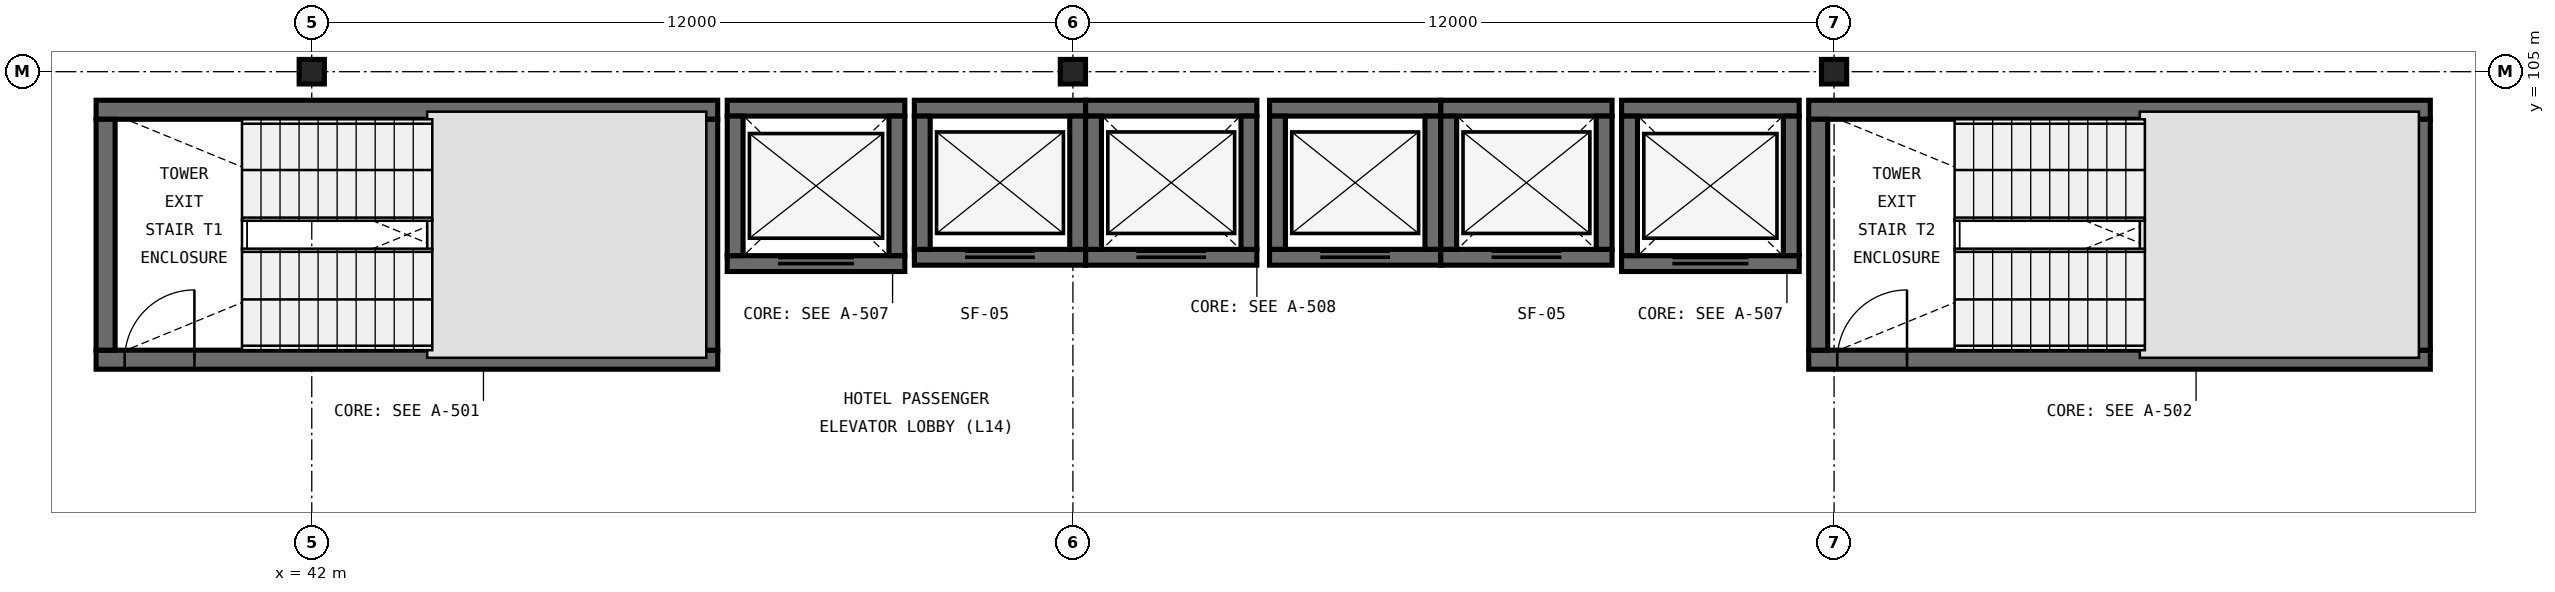
"""IFC4 building model, lengths in metres.
Left out: names, types, materials, properties, quantities, classifications, styles, units other than length and angle.
Written with IfcOpenShell. Run it as: python <this file> out.ifc"""

import sys

from ifc_helpers import new_model, si_unit, direction, frame, frame_2d, origin, origin_2d, place, context, subcontext, project, spatial, rectangle, i_section, extrude, element, fill, save


model = new_model("IFC4")
c1 = context("Model", 3, precision=1e-05, world=origin(), true_north=direction((0.0, 1.0)))
c2 = subcontext(c1, "Body", "Model", "MODEL_VIEW")
j1 = project(units=[si_unit("LENGTHUNIT", "METRE"), si_unit("PLANEANGLEUNIT", "RADIAN")], contexts=[c1])
p1 = place(None, origin())
s1 = spatial("IfcSite", under=j1, at=p1, CompositionType="ELEMENT")
p2 = place(p1, origin())
s2 = spatial("IfcBuilding", under=s1, at=p2, CompositionType="ELEMENT")
p3 = place(p2, frame((0.0, 0.0, 60.0)))
s3 = spatial("IfcBuildingStorey", under=s2, at=p3, CompositionType="ELEMENT", Elevation=60.0)
for number, where, z_axis, x_axis in (
    (1, (42.0, 105.0, 0.0), (0.0, 0.0, 1.0), (1.0, 0.0, 0.0)),
    (2, (54.0, 105.0, 0.0), (0.0, 0.0, 1.0), (1.0, 0.0, 0.0)),
    (3, (66.0, 105.0, 0.0), (0.0, 0.0, 1.0), (1.0, 0.0, 0.0)),
):
    element("IfcColumn", number, at=place(p3, frame(where, z_axis=z_axis, x_axis=x_axis)), inside=s3, PredefinedType="COLUMN", context=c2, shape_type="SweptSolid", body=[
        extrude(i_section(OverallWidth=0.398, OverallDepth=0.387, WebThickness=0.021, FlangeThickness=0.033, FilletRadius=0.031, at=origin_2d()), origin(), (0.0, 0.0, 1.0), 3.6),
    ])
p4 = place(p3, frame((38.6, 100.46, 0.0), z_axis=(0.0, 0.0, 1.0), x_axis=(1.0, 0.0, 0.0)))
e4 = element("IfcWall", 4, at=p4, inside=s3, PredefinedType="SHEAR", context=c2, shape_type="SweptSolid", body=[
    extrude(rectangle(XDim=9.8, YDim=0.3, at=frame_2d((4.9, 0.0))), origin(), (0.0, 0.0, 1.0), 3.6),
])
p5 = place(p4, frame((0.45, 0.0, 0.0)))
e5 = element("IfcOpeningElement", 5, at=p5, cuts=e4, PredefinedType="OPENING", context=c2, shape_type="SweptSolid", body=[
    extrude(rectangle(XDim=1.1, YDim=2.2, at=frame_2d((0.55, 1.1))), frame((0.0, 0.165, 0.0), z_axis=(0.0, -1.0, 0.0), x_axis=(1.0, 0.0, 0.0)), (0.0, 0.0, 1.0), 0.33),
])
p6 = place(p3, frame((48.4, 104.4, 0.0), z_axis=(0.0, 0.0, 1.0), x_axis=(-1.0, 0.0, 0.0)))
e6 = element("IfcWall", 6, at=p6, inside=s3, PredefinedType="SHEAR", context=c2, shape_type="SweptSolid", body=[
    extrude(rectangle(XDim=9.8, YDim=0.3, at=frame_2d((4.9, 0.0))), origin(), (0.0, 0.0, 1.0), 3.6),
])
for number, where, z_axis, x_axis in (
    (7, (38.75, 104.25, 0.0), (0.0, 0.0, 1.0), (0.0, -1.0, 0.0)),
    (8, (48.25, 100.61, 0.0), (0.0, 0.0, 1.0), (0.0, 1.0, 0.0)),
):
    element("IfcWall", number, at=place(p3, frame(where, z_axis=z_axis, x_axis=x_axis)), inside=s3, PredefinedType="SHEAR", context=c2, shape_type="SweptSolid", body=[
        extrude(rectangle(XDim=3.64, YDim=0.3, at=frame_2d((1.82, 0.0))), origin(), (0.0, 0.0, 1.0), 3.6),
    ])
p7 = place(p3, frame((65.6, 100.46, 0.0), z_axis=(0.0, 0.0, 1.0), x_axis=(1.0, 0.0, 0.0)))
e9 = element("IfcWall", 9, at=p7, inside=s3, PredefinedType="SHEAR", context=c2, shape_type="SweptSolid", body=[
    extrude(rectangle(XDim=9.8, YDim=0.3, at=frame_2d((4.9, 0.0))), origin(), (0.0, 0.0, 1.0), 3.6),
])
p8 = place(p7, frame((0.45, 0.0, 0.0)))
e10 = element("IfcOpeningElement", 10, at=p8, cuts=e9, PredefinedType="OPENING", context=c2, shape_type="SweptSolid", body=[
    extrude(rectangle(XDim=1.1, YDim=2.2, at=frame_2d((0.55, 1.1))), frame((0.0, 0.165, 0.0), z_axis=(0.0, -1.0, 0.0), x_axis=(1.0, 0.0, 0.0)), (0.0, 0.0, 1.0), 0.33),
])
p9 = place(p3, frame((75.4, 104.4, 0.0), z_axis=(0.0, 0.0, 1.0), x_axis=(-1.0, 0.0, 0.0)))
e11 = element("IfcWall", 11, at=p9, inside=s3, PredefinedType="SHEAR", context=c2, shape_type="SweptSolid", body=[
    extrude(rectangle(XDim=9.8, YDim=0.3, at=frame_2d((4.9, 0.0))), origin(), (0.0, 0.0, 1.0), 3.6),
])
for number, where, z_axis, x_axis in (
    (12, (65.75, 104.25, 0.0), (0.0, 0.0, 1.0), (0.0, -1.0, 0.0)),
    (13, (75.25, 100.61, 0.0), (0.0, 0.0, 1.0), (0.0, 1.0, 0.0)),
):
    element("IfcWall", number, at=place(p3, frame(where, z_axis=z_axis, x_axis=x_axis)), inside=s3, PredefinedType="SHEAR", context=c2, shape_type="SweptSolid", body=[
        extrude(rectangle(XDim=3.64, YDim=0.3, at=frame_2d((1.82, 0.0))), origin(), (0.0, 0.0, 1.0), 3.6),
    ])
p10 = place(p3, frame((48.55, 101.975, 0.0), z_axis=(0.0, 0.0, 1.0), x_axis=(1.0, 0.0, 0.0)))
e14 = element("IfcWall", 14, at=p10, inside=s3, PredefinedType="SHEAR", context=c2, shape_type="SweptSolid", body=[
    extrude(rectangle(XDim=2.8, YDim=0.25, at=frame_2d((1.4, 0.0))), origin(), (0.0, 0.0, 1.0), 3.6),
])
p11 = place(p10, frame((0.8, 0.0, 0.0)))
e15 = element("IfcOpeningElement", 15, at=p11, cuts=e14, PredefinedType="OPENING", context=c2, shape_type="SweptSolid", body=[
    extrude(rectangle(XDim=1.2, YDim=2.2, at=frame_2d((0.6, 1.1))), frame((0.0, 0.14, 0.0), z_axis=(0.0, -1.0, 0.0), x_axis=(1.0, 0.0, 0.0)), (0.0, 0.0, 1.0), 0.28),
])
p12 = place(p3, frame((51.35, 104.425, 0.0), z_axis=(0.0, 0.0, 1.0), x_axis=(-1.0, 0.0, 0.0)))
e16 = element("IfcWall", 16, at=p12, inside=s3, PredefinedType="SHEAR", context=c2, shape_type="SweptSolid", body=[
    extrude(rectangle(XDim=2.8, YDim=0.25, at=frame_2d((1.4, 0.0))), origin(), (0.0, 0.0, 1.0), 3.6),
])
for number, where, z_axis, x_axis in (
    (17, (48.675, 104.3, 0.0), (0.0, 0.0, 1.0), (0.0, -1.0, 0.0)),
    (18, (51.225, 102.1, 0.0), (0.0, 0.0, 1.0), (0.0, 1.0, 0.0)),
):
    element("IfcWall", number, at=place(p3, frame(where, z_axis=z_axis, x_axis=x_axis)), inside=s3, PredefinedType="SHEAR", context=c2, shape_type="SweptSolid", body=[
        extrude(rectangle(XDim=2.2, YDim=0.25, at=frame_2d((1.1, 0.0))), origin(), (0.0, 0.0, 1.0), 3.6),
    ])
p13 = place(p3, frame((62.65, 101.975, 0.0), z_axis=(0.0, 0.0, 1.0), x_axis=(1.0, 0.0, 0.0)))
e19 = element("IfcWall", 19, at=p13, inside=s3, PredefinedType="SHEAR", context=c2, shape_type="SweptSolid", body=[
    extrude(rectangle(XDim=2.8, YDim=0.25, at=frame_2d((1.4, 0.0))), origin(), (0.0, 0.0, 1.0), 3.6),
])
p14 = place(p13, frame((0.8, 0.0, 0.0)))
e20 = element("IfcOpeningElement", 20, at=p14, cuts=e19, PredefinedType="OPENING", context=c2, shape_type="SweptSolid", body=[
    extrude(rectangle(XDim=1.2, YDim=2.2, at=frame_2d((0.6, 1.1))), frame((0.0, 0.14, 0.0), z_axis=(0.0, -1.0, 0.0), x_axis=(1.0, 0.0, 0.0)), (0.0, 0.0, 1.0), 0.28),
])
p15 = place(p3, frame((65.45, 104.425, 0.0), z_axis=(0.0, 0.0, 1.0), x_axis=(-1.0, 0.0, 0.0)))
e21 = element("IfcWall", 21, at=p15, inside=s3, PredefinedType="SHEAR", context=c2, shape_type="SweptSolid", body=[
    extrude(rectangle(XDim=2.8, YDim=0.25, at=frame_2d((1.4, 0.0))), origin(), (0.0, 0.0, 1.0), 3.6),
])
for number, where, z_axis, x_axis in (
    (22, (62.775, 104.3, 0.0), (0.0, 0.0, 1.0), (0.0, -1.0, 0.0)),
    (23, (65.325, 102.1, 0.0), (0.0, 0.0, 1.0), (0.0, 1.0, 0.0)),
):
    element("IfcWall", number, at=place(p3, frame(where, z_axis=z_axis, x_axis=x_axis)), inside=s3, PredefinedType="SHEAR", context=c2, shape_type="SweptSolid", body=[
        extrude(rectangle(XDim=2.2, YDim=0.25, at=frame_2d((1.1, 0.0))), origin(), (0.0, 0.0, 1.0), 3.6),
    ])
p16 = place(p3, frame((51.5, 102.075, 0.0), z_axis=(0.0, 0.0, 1.0), x_axis=(1.0, 0.0, 0.0)))
e24 = element("IfcWall", 24, at=p16, inside=s3, PredefinedType="SHEAR", context=c2, shape_type="SweptSolid", body=[
    extrude(rectangle(XDim=2.7, YDim=0.25, at=frame_2d((1.35, 0.0))), origin(), (0.0, 0.0, 1.0), 3.6),
])
p17 = place(p16, frame((0.8, 0.0, 0.0)))
e25 = element("IfcOpeningElement", 25, at=p17, cuts=e24, PredefinedType="OPENING", context=c2, shape_type="SweptSolid", body=[
    extrude(rectangle(XDim=1.1, YDim=2.2, at=frame_2d((0.55, 1.1))), frame((0.0, 0.14, 0.0), z_axis=(0.0, -1.0, 0.0), x_axis=(1.0, 0.0, 0.0)), (0.0, 0.0, 1.0), 0.28),
])
p18 = place(p3, frame((54.2, 104.425, 0.0), z_axis=(0.0, 0.0, 1.0), x_axis=(-1.0, 0.0, 0.0)))
e26 = element("IfcWall", 26, at=p18, inside=s3, PredefinedType="SHEAR", context=c2, shape_type="SweptSolid", body=[
    extrude(rectangle(XDim=2.7, YDim=0.25, at=frame_2d((1.35, 0.0))), origin(), (0.0, 0.0, 1.0), 3.6),
])
for number, where, z_axis, x_axis in (
    (27, (51.625, 104.3, 0.0), (0.0, 0.0, 1.0), (0.0, -1.0, 0.0)),
    (28, (54.075, 102.2, 0.0), (0.0, 0.0, 1.0), (0.0, 1.0, 0.0)),
):
    element("IfcWall", number, at=place(p3, frame(where, z_axis=z_axis, x_axis=x_axis)), inside=s3, PredefinedType="SHEAR", context=c2, shape_type="SweptSolid", body=[
        extrude(rectangle(XDim=2.1, YDim=0.25, at=frame_2d((1.05, 0.0))), origin(), (0.0, 0.0, 1.0), 3.6),
    ])
p19 = place(p3, frame((54.2, 102.075, 0.0), z_axis=(0.0, 0.0, 1.0), x_axis=(1.0, 0.0, 0.0)))
e29 = element("IfcWall", 29, at=p19, inside=s3, PredefinedType="SHEAR", context=c2, shape_type="SweptSolid", body=[
    extrude(rectangle(XDim=2.7, YDim=0.25, at=frame_2d((1.35, 0.0))), origin(), (0.0, 0.0, 1.0), 3.6),
])
p20 = place(p19, frame((0.8, 0.0, 0.0)))
e30 = element("IfcOpeningElement", 30, at=p20, cuts=e29, PredefinedType="OPENING", context=c2, shape_type="SweptSolid", body=[
    extrude(rectangle(XDim=1.1, YDim=2.2, at=frame_2d((0.55, 1.1))), frame((0.0, 0.14, 0.0), z_axis=(0.0, -1.0, 0.0), x_axis=(1.0, 0.0, 0.0)), (0.0, 0.0, 1.0), 0.28),
])
p21 = place(p3, frame((56.9, 104.425, 0.0), z_axis=(0.0, 0.0, 1.0), x_axis=(-1.0, 0.0, 0.0)))
e31 = element("IfcWall", 31, at=p21, inside=s3, PredefinedType="SHEAR", context=c2, shape_type="SweptSolid", body=[
    extrude(rectangle(XDim=2.7, YDim=0.25, at=frame_2d((1.35, 0.0))), origin(), (0.0, 0.0, 1.0), 3.6),
])
for number, where, z_axis, x_axis in (
    (32, (54.325, 104.3, 0.0), (0.0, 0.0, 1.0), (0.0, -1.0, 0.0)),
    (33, (56.775, 102.2, 0.0), (0.0, 0.0, 1.0), (0.0, 1.0, 0.0)),
):
    element("IfcWall", number, at=place(p3, frame(where, z_axis=z_axis, x_axis=x_axis)), inside=s3, PredefinedType="SHEAR", context=c2, shape_type="SweptSolid", body=[
        extrude(rectangle(XDim=2.1, YDim=0.25, at=frame_2d((1.05, 0.0))), origin(), (0.0, 0.0, 1.0), 3.6),
    ])
p22 = place(p3, frame((57.1, 102.075, 0.0), z_axis=(0.0, 0.0, 1.0), x_axis=(1.0, 0.0, 0.0)))
e34 = element("IfcWall", 34, at=p22, inside=s3, PredefinedType="SHEAR", context=c2, shape_type="SweptSolid", body=[
    extrude(rectangle(XDim=2.7, YDim=0.25, at=frame_2d((1.35, 0.0))), origin(), (0.0, 0.0, 1.0), 3.6),
])
p23 = place(p22, frame((0.8, 0.0, 0.0)))
e35 = element("IfcOpeningElement", 35, at=p23, cuts=e34, PredefinedType="OPENING", context=c2, shape_type="SweptSolid", body=[
    extrude(rectangle(XDim=1.1, YDim=2.2, at=frame_2d((0.55, 1.1))), frame((0.0, 0.14, 0.0), z_axis=(0.0, -1.0, 0.0), x_axis=(1.0, 0.0, 0.0)), (0.0, 0.0, 1.0), 0.28),
])
p24 = place(p3, frame((59.8, 104.425, 0.0), z_axis=(0.0, 0.0, 1.0), x_axis=(-1.0, 0.0, 0.0)))
e36 = element("IfcWall", 36, at=p24, inside=s3, PredefinedType="SHEAR", context=c2, shape_type="SweptSolid", body=[
    extrude(rectangle(XDim=2.7, YDim=0.25, at=frame_2d((1.35, 0.0))), origin(), (0.0, 0.0, 1.0), 3.6),
])
for number, where, z_axis, x_axis in (
    (37, (57.225, 104.3, 0.0), (0.0, 0.0, 1.0), (0.0, -1.0, 0.0)),
    (38, (59.675, 102.2, 0.0), (0.0, 0.0, 1.0), (0.0, 1.0, 0.0)),
):
    element("IfcWall", number, at=place(p3, frame(where, z_axis=z_axis, x_axis=x_axis)), inside=s3, PredefinedType="SHEAR", context=c2, shape_type="SweptSolid", body=[
        extrude(rectangle(XDim=2.1, YDim=0.25, at=frame_2d((1.05, 0.0))), origin(), (0.0, 0.0, 1.0), 3.6),
    ])
p25 = place(p3, frame((59.8, 102.075, 0.0), z_axis=(0.0, 0.0, 1.0), x_axis=(1.0, 0.0, 0.0)))
e39 = element("IfcWall", 39, at=p25, inside=s3, PredefinedType="SHEAR", context=c2, shape_type="SweptSolid", body=[
    extrude(rectangle(XDim=2.7, YDim=0.25, at=frame_2d((1.35, 0.0))), origin(), (0.0, 0.0, 1.0), 3.6),
])
p26 = place(p25, frame((0.8, 0.0, 0.0)))
e40 = element("IfcOpeningElement", 40, at=p26, cuts=e39, PredefinedType="OPENING", context=c2, shape_type="SweptSolid", body=[
    extrude(rectangle(XDim=1.1, YDim=2.2, at=frame_2d((0.55, 1.1))), frame((0.0, 0.14, 0.0), z_axis=(0.0, -1.0, 0.0), x_axis=(1.0, 0.0, 0.0)), (0.0, 0.0, 1.0), 0.28),
])
p27 = place(p3, frame((62.5, 104.425, 0.0), z_axis=(0.0, 0.0, 1.0), x_axis=(-1.0, 0.0, 0.0)))
e41 = element("IfcWall", 41, at=p27, inside=s3, PredefinedType="SHEAR", context=c2, shape_type="SweptSolid", body=[
    extrude(rectangle(XDim=2.7, YDim=0.25, at=frame_2d((1.35, 0.0))), origin(), (0.0, 0.0, 1.0), 3.6),
])
for number, where, z_axis, x_axis in (
    (42, (59.925, 104.3, 0.0), (0.0, 0.0, 1.0), (0.0, -1.0, 0.0)),
    (43, (62.375, 102.2, 0.0), (0.0, 0.0, 1.0), (0.0, 1.0, 0.0)),
):
    element("IfcWall", number, at=place(p3, frame(where, z_axis=z_axis, x_axis=x_axis)), inside=s3, PredefinedType="SHEAR", context=c2, shape_type="SweptSolid", body=[
        extrude(rectangle(XDim=2.1, YDim=0.25, at=frame_2d((1.05, 0.0))), origin(), (0.0, 0.0, 1.0), 3.6),
    ])
p28 = place(p5, origin())
e44 = element("IfcDoor", 44, at=p28, inside=s3, OperationType="SINGLE_SWING_RIGHT", PredefinedType="DOOR", context=c2, shape_type="SweptSolid", body=[
    extrude(rectangle(XDim=1.1, YDim=2.2, at=frame_2d((0.55, 1.1))), frame((0.0, 0.025, 0.0), z_axis=(0.0, -1.0, 0.0), x_axis=(1.0, 0.0, 0.0)), (0.0, 0.0, 1.0), 0.05),
])
fill(e5, e44)
p29 = place(p8, origin())
e45 = element("IfcDoor", 45, at=p29, inside=s3, OperationType="SINGLE_SWING_RIGHT", PredefinedType="DOOR", context=c2, shape_type="SweptSolid", body=[
    extrude(rectangle(XDim=1.1, YDim=2.2, at=frame_2d((0.55, 1.1))), frame((0.0, 0.025, 0.0), z_axis=(0.0, -1.0, 0.0), x_axis=(1.0, 0.0, 0.0)), (0.0, 0.0, 1.0), 0.05),
])
fill(e10, e45)
p30 = place(p11, origin())
e46 = element("IfcDoor", 46, at=p30, inside=s3, OperationType="DOUBLE_DOOR_SLIDING", PredefinedType="DOOR", context=c2, shape_type="SweptSolid", body=[
    extrude(rectangle(XDim=1.2, YDim=2.2, at=frame_2d((0.6, 1.1))), frame((0.0, 0.025, 0.0), z_axis=(0.0, -1.0, 0.0), x_axis=(1.0, 0.0, 0.0)), (0.0, 0.0, 1.0), 0.05),
])
fill(e15, e46)
p31 = place(p14, origin())
e47 = element("IfcDoor", 47, at=p31, inside=s3, OperationType="DOUBLE_DOOR_SLIDING", PredefinedType="DOOR", context=c2, shape_type="SweptSolid", body=[
    extrude(rectangle(XDim=1.2, YDim=2.2, at=frame_2d((0.6, 1.1))), frame((0.0, 0.025, 0.0), z_axis=(0.0, -1.0, 0.0), x_axis=(1.0, 0.0, 0.0)), (0.0, 0.0, 1.0), 0.05),
])
fill(e20, e47)
p32 = place(p17, origin())
e48 = element("IfcDoor", 48, at=p32, inside=s3, OperationType="DOUBLE_DOOR_SLIDING", PredefinedType="DOOR", context=c2, shape_type="SweptSolid", body=[
    extrude(rectangle(XDim=1.1, YDim=2.2, at=frame_2d((0.55, 1.1))), frame((0.0, 0.025, 0.0), z_axis=(0.0, -1.0, 0.0), x_axis=(1.0, 0.0, 0.0)), (0.0, 0.0, 1.0), 0.05),
])
fill(e25, e48)
p33 = place(p20, origin())
e49 = element("IfcDoor", 49, at=p33, inside=s3, OperationType="DOUBLE_DOOR_SLIDING", PredefinedType="DOOR", context=c2, shape_type="SweptSolid", body=[
    extrude(rectangle(XDim=1.1, YDim=2.2, at=frame_2d((0.55, 1.1))), frame((0.0, 0.025, 0.0), z_axis=(0.0, -1.0, 0.0), x_axis=(1.0, 0.0, 0.0)), (0.0, 0.0, 1.0), 0.05),
])
fill(e30, e49)
p34 = place(p23, origin())
e50 = element("IfcDoor", 50, at=p34, inside=s3, OperationType="DOUBLE_DOOR_SLIDING", PredefinedType="DOOR", context=c2, shape_type="SweptSolid", body=[
    extrude(rectangle(XDim=1.1, YDim=2.2, at=frame_2d((0.55, 1.1))), frame((0.0, 0.025, 0.0), z_axis=(0.0, -1.0, 0.0), x_axis=(1.0, 0.0, 0.0)), (0.0, 0.0, 1.0), 0.05),
])
fill(e35, e50)
p35 = place(p26, origin())
e51 = element("IfcDoor", 51, at=p35, inside=s3, OperationType="DOUBLE_DOOR_SLIDING", PredefinedType="DOOR", context=c2, shape_type="SweptSolid", body=[
    extrude(rectangle(XDim=1.1, YDim=2.2, at=frame_2d((0.55, 1.1))), frame((0.0, 0.025, 0.0), z_axis=(0.0, -1.0, 0.0), x_axis=(1.0, 0.0, 0.0)), (0.0, 0.0, 1.0), 0.05),
])
fill(e40, e51)
save(model, sys.argv[1])
